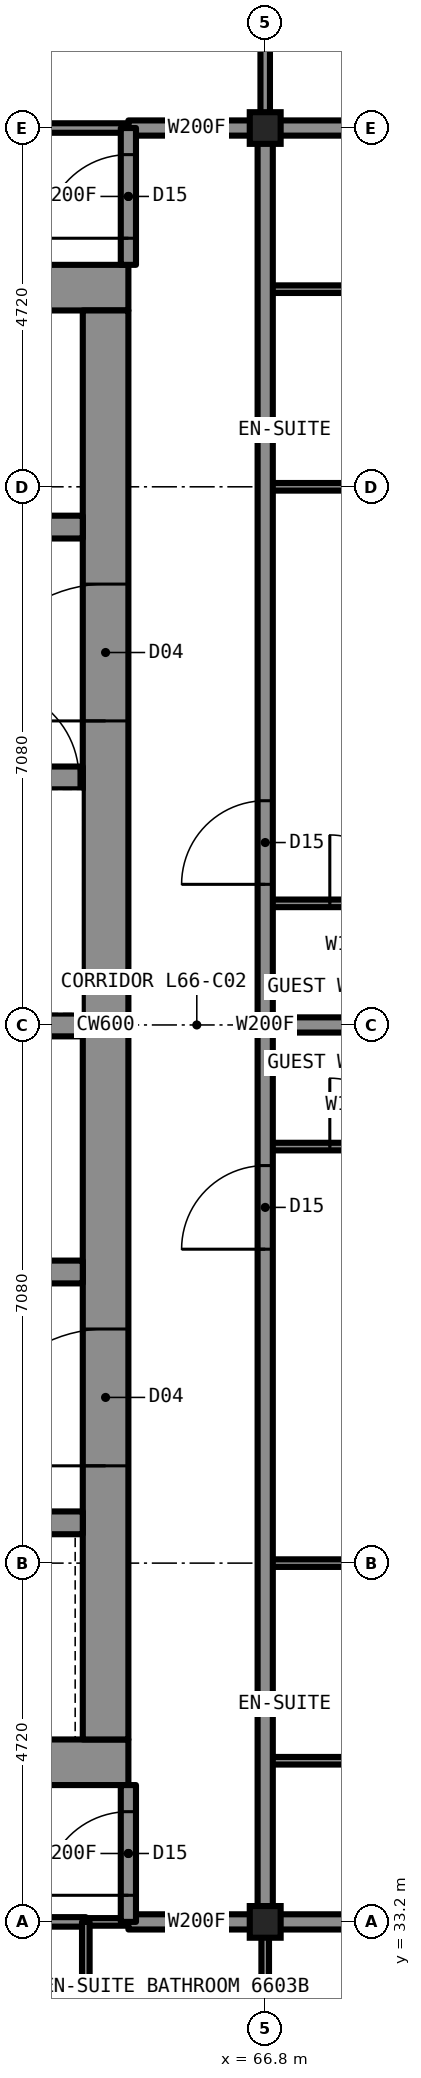
"""IFC4 building model, lengths in metres.
Left out: names, types, materials, properties, quantities, classifications, styles, units other than length and angle.
Written with IfcOpenShell. Run it as: python <this file> out.ifc"""

import sys

from ifc_helpers import new_model, si_unit, direction, frame, frame_2d, origin, origin_2d, place, context, subcontext, project, spatial, rectangle, i_section, extrude, element, fill, save


model = new_model("IFC4")
c1 = context("Model", 3, precision=1e-05, world=origin(), true_north=direction((0.0, 1.0)))
c2 = subcontext(c1, "Body", "Model", "MODEL_VIEW")
j1 = project(units=[si_unit("LENGTHUNIT", "METRE"), si_unit("PLANEANGLEUNIT", "RADIAN")], contexts=[c1])
p1 = place(None, origin())
s1 = spatial("IfcSite", under=j1, at=p1, CompositionType="ELEMENT")
p2 = place(p1, origin())
s2 = spatial("IfcBuilding", under=s1, at=p2, CompositionType="ELEMENT")
p3 = place(p2, frame((0.0, 0.0, 237.2)))
s3 = spatial("IfcBuildingStorey", under=s2, at=p3, CompositionType="ELEMENT", Elevation=237.2)
for number, where, z_axis, x_axis in (
    (1, (66.8, 33.2, 0.0), (0.0, 0.0, 1.0), (1.0, 0.0, 0.0)),
    (2, (66.8, 56.8, 0.0), (0.0, 0.0, 1.0), (1.0, 0.0, 0.0)),
):
    element("IfcColumn", number, at=place(p3, frame(where, z_axis=z_axis, x_axis=x_axis)), inside=s3, PredefinedType="COLUMN", context=c2, shape_type="SweptSolid", body=[
        extrude(i_section(OverallWidth=0.406, OverallDepth=0.417, WebThickness=0.03, FlangeThickness=0.048, at=origin_2d()), origin(), (0.0, 0.0, 1.0), 3.5),
    ])
for number, where, z_axis, x_axis in (
    (3, (45.0, 54.7, 0.0), (0.0, 0.0, 1.0), (1.0, 0.0, 0.0)),
    (4, (45.0, 35.3, 0.0), (0.0, 0.0, 1.0), (1.0, 0.0, 0.0)),
):
    element("IfcWall", number, at=place(p3, frame(where, z_axis=z_axis, x_axis=x_axis)), inside=s3, PredefinedType="SHEAR", context=c2, shape_type="SweptSolid", body=[
        extrude(rectangle(XDim=20.0, YDim=0.6, at=frame_2d((10.0, 0.0))), origin(), (0.0, 0.0, 1.0), 3.5),
    ])
p4 = place(p3, frame((64.7, 35.6, 0.0), z_axis=(0.0, 0.0, 1.0), x_axis=(0.0, 1.0, 0.0)))
e5 = element("IfcWall", 5, at=p4, inside=s3, PredefinedType="SHEAR", context=c2, shape_type="SweptSolid", body=[
    extrude(rectangle(XDim=18.8, YDim=0.6, at=frame_2d((9.4, 0.0))), origin(), (0.0, 0.0, 1.0), 3.5),
])
p5 = place(p4, frame((13.4, 0.0, 0.0)))
e6 = element("IfcOpeningElement", 6, at=p5, cuts=e5, PredefinedType="OPENING", context=c2, shape_type="SweptSolid", body=[
    extrude(rectangle(XDim=1.8, YDim=2.2, at=frame_2d((0.9, 1.1))), frame((0.0, 0.31, 0.0), z_axis=(0.0, -1.0, 0.0), x_axis=(1.0, 0.0, 0.0)), (0.0, 0.0, 1.0), 0.62),
])
p6 = place(p4, frame((3.6, 0.0, 0.0)))
e7 = element("IfcOpeningElement", 7, at=p6, cuts=e5, PredefinedType="OPENING", context=c2, shape_type="SweptSolid", body=[
    extrude(rectangle(XDim=1.8, YDim=2.2, at=frame_2d((0.9, 1.1))), frame((0.0, 0.31, 0.0), z_axis=(0.0, -1.0, 0.0), x_axis=(1.0, 0.0, 0.0)), (0.0, 0.0, 1.0), 0.62),
])
p7 = place(p3, frame((45.6, 51.55, 0.0), z_axis=(0.0, 0.0, 1.0), x_axis=(1.0, 0.0, 0.0)))
e8 = element("IfcWall", 8, at=p7, inside=s3, PredefinedType="SHEAR", context=c2, shape_type="SweptSolid", body=[
    extrude(rectangle(XDim=18.8, YDim=0.3, at=frame_2d((9.4, 0.0))), origin(), (0.0, 0.0, 1.0), 3.5),
])
p8 = place(p7, frame((4.8, 0.0, 0.0)))
e9 = element("IfcOpeningElement", 9, at=p8, cuts=e8, PredefinedType="OPENING", context=c2, shape_type="SweptSolid", body=[
    extrude(rectangle(XDim=1.0, YDim=2.1, at=frame_2d((0.5, 1.05))), frame((0.0, 0.16, 0.0), z_axis=(0.0, -1.0, 0.0), x_axis=(1.0, 0.0, 0.0)), (0.0, 0.0, 1.0), 0.32),
])
p9 = place(p7, frame((11.6, 0.0, 0.0)))
e10 = element("IfcOpeningElement", 10, at=p9, cuts=e8, PredefinedType="OPENING", context=c2, shape_type="SweptSolid", body=[
    extrude(rectangle(XDim=1.1, YDim=2.2, at=frame_2d((0.55, 1.1))), frame((0.0, 0.16, 0.0), z_axis=(0.0, -1.0, 0.0), x_axis=(1.0, 0.0, 0.0)), (0.0, 0.0, 1.0), 0.32),
])
p10 = place(p7, frame((14.3, 0.0, 0.0)))
e11 = element("IfcOpeningElement", 11, at=p10, cuts=e8, PredefinedType="OPENING", context=c2, shape_type="SweptSolid", body=[
    extrude(rectangle(XDim=1.1, YDim=2.2, at=frame_2d((0.55, 1.1))), frame((0.0, 0.16, 0.0), z_axis=(0.0, -1.0, 0.0), x_axis=(1.0, 0.0, 0.0)), (0.0, 0.0, 1.0), 0.32),
])
p11 = place(p3, frame((45.6, 38.45, 0.0), z_axis=(0.0, 0.0, 1.0), x_axis=(1.0, 0.0, 0.0)))
e12 = element("IfcWall", 12, at=p11, inside=s3, PredefinedType="SHEAR", context=c2, shape_type="SweptSolid", body=[
    extrude(rectangle(XDim=18.8, YDim=0.3, at=frame_2d((9.4, 0.0))), origin(), (0.0, 0.0, 1.0), 3.5),
])
p12 = place(p11, frame((0.7, 0.0, 0.0)))
e13 = element("IfcOpeningElement", 13, at=p12, cuts=e12, PredefinedType="OPENING", context=c2, shape_type="SweptSolid", body=[
    extrude(rectangle(XDim=1.1, YDim=2.2, at=frame_2d((0.55, 1.1))), frame((0.0, 0.16, 0.0), z_axis=(0.0, -1.0, 0.0), x_axis=(1.0, 0.0, 0.0)), (0.0, 0.0, 1.0), 0.32),
])
p13 = place(p11, frame((3.4, 0.0, 0.0)))
e14 = element("IfcOpeningElement", 14, at=p13, cuts=e12, PredefinedType="OPENING", context=c2, shape_type="SweptSolid", body=[
    extrude(rectangle(XDim=1.1, YDim=2.2, at=frame_2d((0.55, 1.1))), frame((0.0, 0.16, 0.0), z_axis=(0.0, -1.0, 0.0), x_axis=(1.0, 0.0, 0.0)), (0.0, 0.0, 1.0), 0.32),
])
p14 = place(p11, frame((6.1, 0.0, 0.0)))
e15 = element("IfcOpeningElement", 15, at=p14, cuts=e12, PredefinedType="OPENING", context=c2, shape_type="SweptSolid", body=[
    extrude(rectangle(XDim=1.1, YDim=2.2, at=frame_2d((0.55, 1.1))), frame((0.0, 0.16, 0.0), z_axis=(0.0, -1.0, 0.0), x_axis=(1.0, 0.0, 0.0)), (0.0, 0.0, 1.0), 0.32),
])
p15 = place(p11, frame((8.8, 0.0, 0.0)))
e16 = element("IfcOpeningElement", 16, at=p15, cuts=e12, PredefinedType="OPENING", context=c2, shape_type="SweptSolid", body=[
    extrude(rectangle(XDim=1.1, YDim=2.2, at=frame_2d((0.55, 1.1))), frame((0.0, 0.16, 0.0), z_axis=(0.0, -1.0, 0.0), x_axis=(1.0, 0.0, 0.0)), (0.0, 0.0, 1.0), 0.32),
])
p16 = place(p3, frame((56.2, 48.25, 0.0), z_axis=(0.0, 0.0, 1.0), x_axis=(1.0, 0.0, 0.0)))
e17 = element("IfcWall", 17, at=p16, inside=s3, PredefinedType="SHEAR", context=c2, shape_type="SweptSolid", body=[
    extrude(rectangle(XDim=8.2, YDim=0.3, at=frame_2d((4.1, 0.0))), origin(), (0.0, 0.0, 1.0), 3.5),
])
p17 = place(p16, frame((6.95, 0.0, 0.0)))
e18 = element("IfcOpeningElement", 18, at=p17, cuts=e17, PredefinedType="OPENING", context=c2, shape_type="SweptSolid", body=[
    extrude(rectangle(XDim=1.2, YDim=2.2, at=frame_2d((0.6, 1.1))), frame((0.0, 0.16, 0.0), z_axis=(0.0, -1.0, 0.0), x_axis=(1.0, 0.0, 0.0)), (0.0, 0.0, 1.0), 0.32),
])
p18 = place(p3, frame((56.2, 41.75, 0.0), z_axis=(0.0, 0.0, 1.0), x_axis=(1.0, 0.0, 0.0)))
e19 = element("IfcWall", 19, at=p18, inside=s3, PredefinedType="SHEAR", context=c2, shape_type="SweptSolid", body=[
    extrude(rectangle(XDim=8.2, YDim=0.3, at=frame_2d((4.1, 0.0))), origin(), (0.0, 0.0, 1.0), 3.5),
])
p19 = place(p18, frame((3.3, 0.0, 0.0)))
e20 = element("IfcOpeningElement", 20, at=p19, cuts=e19, PredefinedType="OPENING", context=c2, shape_type="SweptSolid", body=[
    extrude(rectangle(XDim=1.0, YDim=2.1, at=frame_2d((0.5, 1.05))), frame((0.0, 0.16, 0.0), z_axis=(0.0, -1.0, 0.0), x_axis=(1.0, 0.0, 0.0)), (0.0, 0.0, 1.0), 0.32),
])
p20 = place(p3, frame((56.5, 45.0, 0.0), z_axis=(0.0, 0.0, 1.0), x_axis=(1.0, 0.0, 0.0)))
e21 = element("IfcWall", 21, at=p20, inside=s3, PredefinedType="SHEAR", context=c2, shape_type="SweptSolid", body=[
    extrude(rectangle(XDim=7.9, YDim=0.3, at=frame_2d((3.95, 0.0))), origin(), (0.0, 0.0, 1.0), 3.5),
])
p21 = place(p3, frame((66.8, 43.4, 0.0), z_axis=(0.0, 0.0, 1.0), x_axis=(1.0, 0.0, 0.0)))
e22 = element("IfcWall", 22, at=p21, inside=s3, PredefinedType="PARTITIONING", context=c2, shape_type="SweptSolid", body=[
    extrude(rectangle(XDim=2.2, YDim=0.1, at=frame_2d((1.1, 0.0))), origin(), (0.0, 0.0, 1.0), 3.33),
])
p22 = place(p21, frame((0.85, 0.0, 0.0)))
e23 = element("IfcOpeningElement", 23, at=p22, cuts=e22, PredefinedType="OPENING", context=c2, shape_type="SweptSolid", body=[
    extrude(rectangle(XDim=0.9, YDim=2.1, at=frame_2d((0.45, 1.05))), frame((0.0, 0.06, 0.0), z_axis=(0.0, -1.0, 0.0), x_axis=(1.0, 0.0, 0.0)), (0.0, 0.0, 1.0), 0.12),
])
p23 = place(p3, frame((64.44, 33.2, 0.0), z_axis=(0.0, 0.0, 1.0), x_axis=(1.0, 0.0, 0.0)))
e24 = element("IfcWall", 24, at=p23, inside=s3, PredefinedType="PARTITIONING", context=c2, shape_type="SweptSolid", body=[
    extrude(rectangle(XDim=0.56, YDim=0.1, at=frame_2d((0.28, 0.0))), origin(), (0.0, 0.0, 1.0), 3.33),
])
p24 = place(p3, frame((65.0, 33.2, 0.0), z_axis=(0.0, 0.0, 1.0), x_axis=(1.0, 0.0, 0.0)))
e25 = element("IfcWall", 25, at=p24, inside=s3, PredefinedType="PARTITIONING", context=c2, shape_type="SweptSolid", body=[
    extrude(rectangle(XDim=1.8, YDim=0.2, at=frame_2d((0.9, 0.0))), origin(), (0.0, 0.0, 1.0), 3.33),
])
p25 = place(p3, frame((66.8, 33.2, 0.0), z_axis=(0.0, 0.0, 1.0), x_axis=(1.0, 0.0, 0.0)))
e26 = element("IfcWall", 26, at=p25, inside=s3, PredefinedType="PARTITIONING", context=c2, shape_type="SweptSolid", body=[
    extrude(rectangle(XDim=5.9, YDim=0.2, at=frame_2d((2.95, 0.0))), origin(), (0.0, 0.0, 1.0), 2.573),
])
p26 = place(p3, frame((56.6, 33.2, 0.0), z_axis=(0.0, 0.0, 1.0), x_axis=(1.0, 0.0, 0.0)))
e27 = element("IfcWall", 27, at=p26, inside=s3, PredefinedType="PARTITIONING", context=c2, shape_type="SweptSolid", body=[
    extrude(rectangle(XDim=7.84, YDim=0.125, at=frame_2d((3.92, 0.0))), origin(), (0.0, 0.0, 1.0), 3.33),
])
p27 = place(p26, frame((3.45, 0.0, 0.0)))
e28 = element("IfcOpeningElement", 28, at=p27, cuts=e27, PredefinedType="OPENING", context=c2, shape_type="SweptSolid", body=[
    extrude(rectangle(XDim=0.9, YDim=2.2, at=frame_2d((0.45, 1.1))), frame((0.0, 0.073, 0.0), z_axis=(0.0, -1.0, 0.0), x_axis=(1.0, 0.0, 0.0)), (0.0, 0.0, 1.0), 0.145),
])
p28 = place(p3, frame((66.8, 37.92, 0.0), z_axis=(0.0, 0.0, 1.0), x_axis=(1.0, 0.0, 0.0)))
e29 = element("IfcWall", 29, at=p28, inside=s3, PredefinedType="PARTITIONING", context=c2, shape_type="SweptSolid", body=[
    extrude(rectangle(XDim=2.8, YDim=0.1, at=frame_2d((1.4, 0.0))), origin(), (0.0, 0.0, 1.0), 2.573),
])
p29 = place(p3, frame((66.8, 35.32, 0.0), z_axis=(0.0, 0.0, 1.0), x_axis=(1.0, 0.0, 0.0)))
e30 = element("IfcWall", 30, at=p29, inside=s3, PredefinedType="PARTITIONING", context=c2, shape_type="SweptSolid", body=[
    extrude(rectangle(XDim=2.8, YDim=0.1, at=frame_2d((1.4, 0.0))), origin(), (0.0, 0.0, 1.0), 3.33),
])
p30 = place(p3, frame((66.8, 45.0, 0.0), z_axis=(0.0, 0.0, 1.0), x_axis=(1.0, 0.0, 0.0)))
e31 = element("IfcWall", 31, at=p30, inside=s3, PredefinedType="PARTITIONING", context=c2, shape_type="SweptSolid", body=[
    extrude(rectangle(XDim=5.9, YDim=0.2, at=frame_2d((2.95, 0.0))), origin(), (0.0, 0.0, 1.0), 2.797),
])
p31 = place(p3, frame((66.8, 46.6, 0.0), z_axis=(0.0, 0.0, 1.0), x_axis=(1.0, 0.0, 0.0)))
e32 = element("IfcWall", 32, at=p31, inside=s3, PredefinedType="PARTITIONING", context=c2, shape_type="SweptSolid", body=[
    extrude(rectangle(XDim=2.2, YDim=0.1, at=frame_2d((1.1, 0.0))), origin(), (0.0, 0.0, 1.0), 3.33),
])
p32 = place(p31, frame((0.85, 0.0, 0.0)))
e33 = element("IfcOpeningElement", 33, at=p32, cuts=e32, PredefinedType="OPENING", context=c2, shape_type="SweptSolid", body=[
    extrude(rectangle(XDim=0.9, YDim=2.1, at=frame_2d((0.45, 1.05))), frame((0.0, 0.06, 0.0), z_axis=(0.0, -1.0, 0.0), x_axis=(1.0, 0.0, 0.0)), (0.0, 0.0, 1.0), 0.12),
])
p33 = place(p3, frame((65.0, 56.8, 0.0), z_axis=(0.0, 0.0, 1.0), x_axis=(1.0, 0.0, 0.0)))
e34 = element("IfcWall", 34, at=p33, inside=s3, PredefinedType="PARTITIONING", context=c2, shape_type="SweptSolid", body=[
    extrude(rectangle(XDim=1.8, YDim=0.2, at=frame_2d((0.9, 0.0))), origin(), (0.0, 0.0, 1.0), 3.33),
])
p34 = place(p3, frame((66.8, 56.8, 0.0), z_axis=(0.0, 0.0, 1.0), x_axis=(1.0, 0.0, 0.0)))
e35 = element("IfcWall", 35, at=p34, inside=s3, PredefinedType="PARTITIONING", context=c2, shape_type="SweptSolid", body=[
    extrude(rectangle(XDim=5.9, YDim=0.2, at=frame_2d((2.95, 0.0))), origin(), (0.0, 0.0, 1.0), 2.573),
])
p35 = place(p3, frame((62.08, 56.8, 0.0), z_axis=(0.0, 0.0, 1.0), x_axis=(1.0, 0.0, 0.0)))
e36 = element("IfcWall", 36, at=p35, inside=s3, PredefinedType="PARTITIONING", context=c2, shape_type="SweptSolid", body=[
    extrude(rectangle(XDim=2.92, YDim=0.125, at=frame_2d((1.46, 0.0))), origin(), (0.0, 0.0, 1.0), 3.33),
])
p36 = place(p3, frame((66.8, 52.08, 0.0), z_axis=(0.0, 0.0, 1.0), x_axis=(1.0, 0.0, 0.0)))
e37 = element("IfcWall", 37, at=p36, inside=s3, PredefinedType="PARTITIONING", context=c2, shape_type="SweptSolid", body=[
    extrude(rectangle(XDim=2.8, YDim=0.1, at=frame_2d((1.4, 0.0))), origin(), (0.0, 0.0, 1.0), 2.573),
])
p37 = place(p3, frame((66.8, 54.68, 0.0), z_axis=(0.0, 0.0, 1.0), x_axis=(1.0, 0.0, 0.0)))
e38 = element("IfcWall", 38, at=p37, inside=s3, PredefinedType="PARTITIONING", context=c2, shape_type="SweptSolid", body=[
    extrude(rectangle(XDim=2.8, YDim=0.1, at=frame_2d((1.4, 0.0))), origin(), (0.0, 0.0, 1.0), 3.33),
])
p38 = place(p3, frame((65.0, 33.2, 0.0), z_axis=(0.0, 0.0, 1.0), x_axis=(0.0, 1.0, 0.0)))
e39 = element("IfcWall", 39, at=p38, inside=s3, PredefinedType="PARTITIONING", context=c2, shape_type="SweptSolid", body=[
    extrude(rectangle(XDim=1.8, YDim=0.2, at=frame_2d((0.9, 0.0))), origin(), (0.0, 0.0, 1.0), 3.33),
])
p39 = place(p38, frame((0.35, 0.0, 0.0)))
e40 = element("IfcOpeningElement", 40, at=p39, cuts=e39, PredefinedType="OPENING", context=c2, shape_type="SweptSolid", body=[
    extrude(rectangle(XDim=1.1, YDim=2.2, at=frame_2d((0.55, 1.1))), frame((0.0, 0.11, 0.0), z_axis=(0.0, -1.0, 0.0), x_axis=(1.0, 0.0, 0.0)), (0.0, 0.0, 1.0), 0.22),
])
p40 = place(p3, frame((65.0, 55.0, 0.0), z_axis=(0.0, 0.0, 1.0), x_axis=(0.0, 1.0, 0.0)))
e41 = element("IfcWall", 41, at=p40, inside=s3, PredefinedType="PARTITIONING", context=c2, shape_type="SweptSolid", body=[
    extrude(rectangle(XDim=1.8, YDim=0.2, at=frame_2d((0.9, 0.0))), origin(), (0.0, 0.0, 1.0), 3.33),
])
p41 = place(p40, frame((0.35, 0.0, 0.0)))
e42 = element("IfcOpeningElement", 42, at=p41, cuts=e41, PredefinedType="OPENING", context=c2, shape_type="SweptSolid", body=[
    extrude(rectangle(XDim=1.1, YDim=2.2, at=frame_2d((0.55, 1.1))), frame((0.0, 0.11, 0.0), z_axis=(0.0, -1.0, 0.0), x_axis=(1.0, 0.0, 0.0)), (0.0, 0.0, 1.0), 0.22),
])
p42 = place(p3, frame((66.8, 30.4, 0.0), z_axis=(0.0, 0.0, 1.0), x_axis=(0.0, 1.0, 0.0)))
e43 = element("IfcWall", 43, at=p42, inside=s3, PredefinedType="PARTITIONING", context=c2, shape_type="SweptSolid", body=[
    extrude(rectangle(XDim=2.8, YDim=0.1, at=frame_2d((1.4, 0.0))), origin(), (0.0, 0.0, 1.0), 2.573),
])
p43 = place(p3, frame((66.8, 33.2, 0.0), z_axis=(0.0, 0.0, 1.0), x_axis=(0.0, 1.0, 0.0)))
e44 = element("IfcWall", 44, at=p43, inside=s3, PredefinedType="PARTITIONING", context=c2, shape_type="SweptSolid", body=[
    extrude(rectangle(XDim=23.6, YDim=0.2, at=frame_2d((11.8, 0.0))), origin(), (0.0, 0.0, 1.0), 3.33),
])
p44 = place(p43, frame((8.85, 0.0, 0.0)))
e45 = element("IfcOpeningElement", 45, at=p44, cuts=e44, PredefinedType="OPENING", context=c2, shape_type="SweptSolid", body=[
    extrude(rectangle(XDim=1.1, YDim=2.2, at=frame_2d((0.55, 1.1))), frame((0.0, 0.11, 0.0), z_axis=(0.0, -1.0, 0.0), x_axis=(1.0, 0.0, 0.0)), (0.0, 0.0, 1.0), 0.22),
])
p45 = place(p43, frame((13.65, 0.0, 0.0)))
e46 = element("IfcOpeningElement", 46, at=p45, cuts=e44, PredefinedType="OPENING", context=c2, shape_type="SweptSolid", body=[
    extrude(rectangle(XDim=1.1, YDim=2.2, at=frame_2d((0.55, 1.1))), frame((0.0, 0.11, 0.0), z_axis=(0.0, -1.0, 0.0), x_axis=(1.0, 0.0, 0.0)), (0.0, 0.0, 1.0), 0.22),
])
p46 = place(p3, frame((66.8, 56.8, 0.0), z_axis=(0.0, 0.0, 1.0), x_axis=(0.0, 1.0, 0.0)))
e47 = element("IfcWall", 47, at=p46, inside=s3, PredefinedType="PARTITIONING", context=c2, shape_type="SweptSolid", body=[
    extrude(rectangle(XDim=5.9, YDim=0.125, at=frame_2d((2.95, 0.0))), origin(), (0.0, 0.0, 1.0), 2.573),
])
p47 = place(p46, frame((3.55, 0.0, 0.0)))
e48 = element("IfcOpeningElement", 48, at=p47, cuts=e47, PredefinedType="OPENING", context=c2, shape_type="SweptSolid", body=[
    extrude(rectangle(XDim=0.9, YDim=2.2, at=frame_2d((0.45, 1.1))), frame((0.0, 0.073, 0.0), z_axis=(0.0, -1.0, 0.0), x_axis=(1.0, 0.0, 0.0)), (0.0, 0.0, 1.0), 0.145),
])
p48 = place(p3, frame((64.44, 30.4, 0.0), z_axis=(0.0, 0.0, 1.0), x_axis=(0.0, 1.0, 0.0)))
e49 = element("IfcWall", 49, at=p48, inside=s3, PredefinedType="PARTITIONING", context=c2, shape_type="SweptSolid", body=[
    extrude(rectangle(XDim=2.8, YDim=0.1, at=frame_2d((1.4, 0.0))), origin(), (0.0, 0.0, 1.0), 3.33),
])
p49 = place(p41, origin())
e50 = element("IfcDoor", 50, at=p49, inside=s3, OperationType="SINGLE_SWING_LEFT", PredefinedType="DOOR", context=c2, shape_type="SweptSolid", body=[
    extrude(rectangle(XDim=1.1, YDim=2.2, at=frame_2d((0.55, 1.1))), frame((0.0, 0.025, 0.0), z_axis=(0.0, -1.0, 0.0), x_axis=(1.0, 0.0, 0.0)), (0.0, 0.0, 1.0), 0.05),
])
fill(e42, e50)
p50 = place(p39, origin())
e51 = element("IfcDoor", 51, at=p50, inside=s3, OperationType="SINGLE_SWING_LEFT", PredefinedType="DOOR", context=c2, shape_type="SweptSolid", body=[
    extrude(rectangle(XDim=1.1, YDim=2.2, at=frame_2d((0.55, 1.1))), frame((0.0, 0.025, 0.0), z_axis=(0.0, -1.0, 0.0), x_axis=(1.0, 0.0, 0.0)), (0.0, 0.0, 1.0), 0.05),
])
fill(e40, e51)
p51 = place(p44, origin())
e52 = element("IfcDoor", 52, at=p51, inside=s3, OperationType="SINGLE_SWING_LEFT", PredefinedType="DOOR", context=c2, shape_type="SweptSolid", body=[
    extrude(rectangle(XDim=1.1, YDim=2.2, at=frame_2d((0.55, 1.1))), frame((0.0, 0.025, 0.0), z_axis=(0.0, -1.0, 0.0), x_axis=(1.0, 0.0, 0.0)), (0.0, 0.0, 1.0), 0.05),
])
fill(e45, e52)
p52 = place(p22, origin())
e53 = element("IfcDoor", 53, at=p52, inside=s3, OperationType="SINGLE_SWING_LEFT", PredefinedType="DOOR", context=c2, shape_type="SweptSolid", body=[
    extrude(rectangle(XDim=0.9, YDim=2.1, at=frame_2d((0.45, 1.05))), frame((0.0, 0.025, 0.0), z_axis=(0.0, -1.0, 0.0), x_axis=(1.0, 0.0, 0.0)), (0.0, 0.0, 1.0), 0.05),
])
fill(e23, e53)
p53 = place(p45, origin())
e54 = element("IfcDoor", 54, at=p53, inside=s3, OperationType="SINGLE_SWING_LEFT", PredefinedType="DOOR", context=c2, shape_type="SweptSolid", body=[
    extrude(rectangle(XDim=1.1, YDim=2.2, at=frame_2d((0.55, 1.1))), frame((0.0, 0.025, 0.0), z_axis=(0.0, -1.0, 0.0), x_axis=(1.0, 0.0, 0.0)), (0.0, 0.0, 1.0), 0.05),
])
fill(e46, e54)
p54 = place(p32, origin())
e55 = element("IfcDoor", 55, at=p54, inside=s3, OperationType="SINGLE_SWING_LEFT", PredefinedType="DOOR", context=c2, shape_type="SweptSolid", body=[
    extrude(rectangle(XDim=0.9, YDim=2.1, at=frame_2d((0.45, 1.05))), frame((0.0, 0.025, 0.0), z_axis=(0.0, -1.0, 0.0), x_axis=(1.0, 0.0, 0.0)), (0.0, 0.0, 1.0), 0.05),
])
fill(e33, e55)
p55 = place(p5, origin())
e56 = element("IfcDoor", 56, at=p55, inside=s3, OperationType="DOUBLE_DOOR_SINGLE_SWING", PredefinedType="DOOR", context=c2, shape_type="SweptSolid", body=[
    extrude(rectangle(XDim=1.8, YDim=2.2, at=frame_2d((0.9, 1.1))), frame((0.0, 0.025, 0.0), z_axis=(0.0, -1.0, 0.0), x_axis=(1.0, 0.0, 0.0)), (0.0, 0.0, 1.0), 0.05),
])
fill(e6, e56)
p56 = place(p6, origin())
e57 = element("IfcDoor", 57, at=p56, inside=s3, OperationType="DOUBLE_DOOR_SINGLE_SWING", PredefinedType="DOOR", context=c2, shape_type="SweptSolid", body=[
    extrude(rectangle(XDim=1.8, YDim=2.2, at=frame_2d((0.9, 1.1))), frame((0.0, 0.025, 0.0), z_axis=(0.0, -1.0, 0.0), x_axis=(1.0, 0.0, 0.0)), (0.0, 0.0, 1.0), 0.05),
])
fill(e7, e57)
p57 = place(p17, origin())
e58 = element("IfcDoor", 58, at=p57, inside=s3, OperationType="SINGLE_SWING_LEFT", PredefinedType="DOOR", context=c2, shape_type="SweptSolid", body=[
    extrude(rectangle(XDim=1.2, YDim=2.2, at=frame_2d((0.6, 1.1))), frame((0.0, 0.025, 0.0), z_axis=(0.0, -1.0, 0.0), x_axis=(1.0, 0.0, 0.0)), (0.0, 0.0, 1.0), 0.05),
])
fill(e18, e58)
save(model, sys.argv[1])
